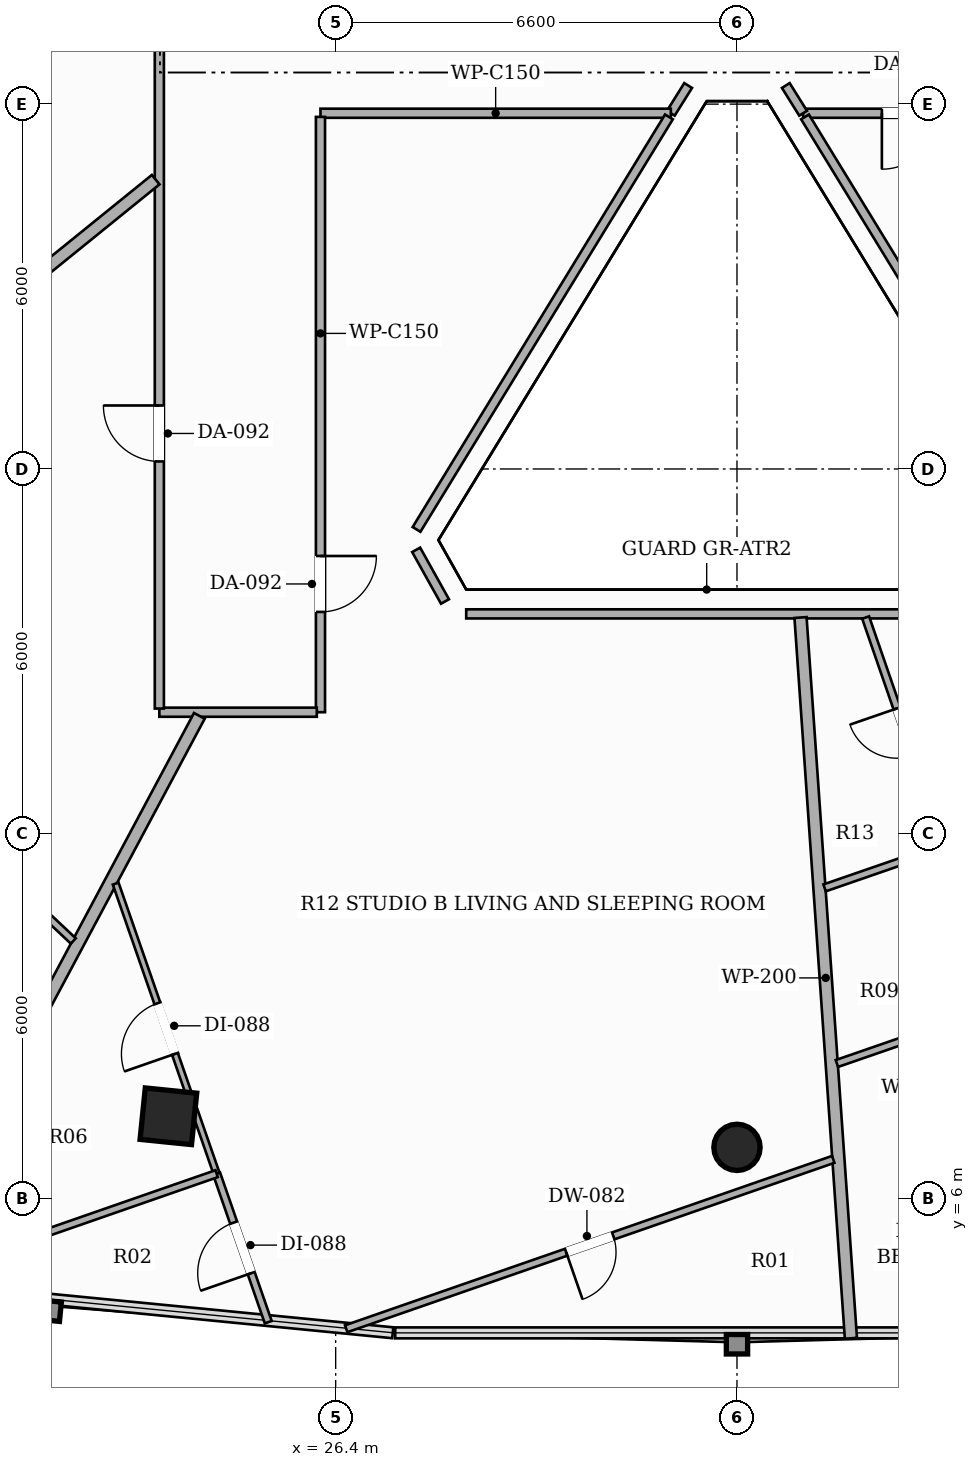
"""IFC4 building model, lengths in metres.
Left out: names, types, materials, properties, quantities, classifications, styles, units other than length and angle.
Written with IfcOpenShell. Run it as: python <this file> out.ifc"""

import sys

from ifc_helpers import new_model, si_unit, direction, frame, frame_2d, origin, origin_2d, place, context, subcontext, project, spatial, rectangle, hollow_rectangle, hollow_circle, extrude, element, fill, save


model = new_model("IFC4")
c1 = context("Model", 3, precision=1e-05, world=origin(), true_north=direction((0.0, 1.0)))
c2 = subcontext(c1, "Body", "Model", "MODEL_VIEW")
j1 = project(units=[si_unit("LENGTHUNIT", "METRE"), si_unit("PLANEANGLEUNIT", "RADIAN")], contexts=[c1])
p1 = place(None, origin())
s1 = spatial("IfcSite", under=j1, at=p1, CompositionType="ELEMENT")
p2 = place(p1, origin())
s2 = spatial("IfcBuilding", under=s1, at=p2, CompositionType="ELEMENT")
p3 = place(p2, frame((0.0, 0.0, 163.85)))
s3 = spatial("IfcBuildingStorey", under=s2, at=p3, CompositionType="ELEMENT", Elevation=163.85)
p4 = place(p3, frame((23.649, 7.355, 0.0), z_axis=(0.0, 0.0, 1.0), x_axis=(-0.994880708829, 0.101056297183, 0.0)))
e1 = element("IfcColumn", 1, at=p4, inside=s3, PredefinedType="COLUMN", context=c2, shape_type="SweptSolid", body=[
    extrude(hollow_rectangle(XDim=0.85, YDim=0.85, WallThickness=0.028, at=origin_2d()), origin(), (0.0, 0.0, 1.0), 3.3),
])
p5 = place(p3, frame((33.0, 6.844, 0.0), z_axis=(0.0, 0.0, 1.0), x_axis=(1.0, 0.0, 0.0)))
e2 = element("IfcColumn", 2, at=p5, inside=s3, PredefinedType="COLUMN", context=c2, shape_type="SweptSolid", body=[
    extrude(hollow_circle(Radius=0.381, WallThickness=0.022, at=origin_2d()), origin(), (0.0, 0.0, 1.0), 3.3),
])
p6 = place(p3, frame((32.197, 24.306, 0.0), z_axis=(0.0, 0.0, 1.0), x_axis=(-0.530039765459, -0.847972786728, 0.0)))
e3 = element("IfcWall", 3, at=p6, inside=s3, PredefinedType="PARTITIONING", context=c2, shape_type="SweptSolid", body=[
    extrude(rectangle(XDim=0.538, YDim=0.15, at=frame_2d((0.269, 0.0))), origin(), (0.0, 0.0, 1.0), 3.06),
])
p7 = place(p3, frame((31.912, 23.85, 0.0), z_axis=(0.0, 0.0, 1.0), x_axis=(-1.0, 0.0, 0.0)))
e4 = element("IfcWall", 4, at=p7, inside=s3, PredefinedType="PARTITIONING", context=c2, shape_type="SweptSolid", body=[
    extrude(rectangle(XDim=5.762, YDim=0.15, at=frame_2d((2.881, 0.0))), origin(), (0.0, 0.0, 1.0), 2.721),
])
p8 = place(p3, frame((26.15, 23.79, 0.0), z_axis=(0.0, 0.0, 1.0), x_axis=(0.0, -1.0, 0.0)))
e5 = element("IfcWall", 5, at=p8, inside=s3, PredefinedType="PARTITIONING", context=c2, shape_type="SweptSolid", body=[
    extrude(rectangle(XDim=9.79, YDim=0.15, at=frame_2d((4.895, 0.0))), origin(), (0.0, 0.0, 1.0), 2.721),
])
p9 = place(p8, frame((7.221, 0.0, 0.0)))
e6 = element("IfcOpeningElement", 6, at=p9, cuts=e5, PredefinedType="OPENING", context=c2, shape_type="SweptSolid", body=[
    extrude(rectangle(XDim=0.92, YDim=2.15, at=frame_2d((0.46, 1.075))), frame((0.0, 0.085, 0.0), z_axis=(0.0, -1.0, 0.0), x_axis=(1.0, 0.0, 0.0)), (0.0, 0.0, 1.0), 0.17),
])
p10 = place(p3, frame((26.09, 14.0, 0.0), z_axis=(0.0, 0.0, 1.0), x_axis=(-1.0, 0.0, 0.0)))
e7 = element("IfcWall", 7, at=p10, inside=s3, PredefinedType="PARTITIONING", context=c2, shape_type="SweptSolid", body=[
    extrude(rectangle(XDim=2.59, YDim=0.15, at=frame_2d((1.295, 0.0))), origin(), (0.0, 0.0, 1.0), 2.721),
])
p11 = place(p3, frame((23.5, 14.06, 0.0), z_axis=(0.0, 0.0, 1.0), x_axis=(0.0, 1.0, 0.0)))
e8 = element("IfcWall", 8, at=p11, inside=s3, PredefinedType="PARTITIONING", context=c2, shape_type="SweptSolid", body=[
    extrude(rectangle(XDim=22.84, YDim=0.15, at=frame_2d((11.42, 0.0))), origin(), (0.0, 0.0, 1.0), 2.413),
])
p12 = place(p11, frame((4.064, 0.0, 0.0)))
e9 = element("IfcOpeningElement", 9, at=p12, cuts=e8, PredefinedType="OPENING", context=c2, shape_type="SweptSolid", body=[
    extrude(rectangle(XDim=0.92, YDim=2.15, at=frame_2d((0.46, 1.075))), frame((0.0, 0.085, 0.0), z_axis=(0.0, -1.0, 0.0), x_axis=(1.0, 0.0, 0.0)), (0.0, 0.0, 1.0), 0.17),
])
p13 = place(p11, frame((13.047, 0.0, 0.0)))
e10 = element("IfcOpeningElement", 10, at=p13, cuts=e8, PredefinedType="OPENING", context=c2, shape_type="SweptSolid", body=[
    extrude(rectangle(XDim=0.88, YDim=2.1, at=frame_2d((0.44, 1.05))), frame((0.0, 0.085, 0.0), z_axis=(0.0, -1.0, 0.0), x_axis=(1.0, 0.0, 0.0)), (0.0, 0.0, 1.0), 0.17),
])
p14 = place(p11, frame((19.953, 0.0, 0.0)))
e11 = element("IfcOpeningElement", 11, at=p14, cuts=e8, PredefinedType="OPENING", context=c2, shape_type="SweptSolid", body=[
    extrude(rectangle(XDim=0.92, YDim=2.15, at=frame_2d((0.46, 1.075))), frame((0.0, 0.085, 0.0), z_axis=(0.0, -1.0, 0.0), x_axis=(1.0, 0.0, 0.0)), (0.0, 0.0, 1.0), 0.17),
])
p15 = place(p3, frame((42.29, 23.85, 0.0), z_axis=(0.0, 0.0, 1.0), x_axis=(-1.0, 0.0, 0.0)))
e12 = element("IfcWall", 12, at=p15, inside=s3, PredefinedType="PARTITIONING", context=c2, shape_type="SweptSolid", body=[
    extrude(rectangle(XDim=8.202, YDim=0.15, at=frame_2d((4.101, 0.0))), origin(), (0.0, 0.0, 1.0), 2.492),
])
p16 = place(p15, frame((5.987, 0.0, 0.0)))
e13 = element("IfcOpeningElement", 13, at=p16, cuts=e12, PredefinedType="OPENING", context=c2, shape_type="SweptSolid", body=[
    extrude(rectangle(XDim=0.92, YDim=2.15, at=frame_2d((0.46, 1.075))), frame((0.0, 0.085, 0.0), z_axis=(0.0, -1.0, 0.0), x_axis=(1.0, 0.0, 0.0)), (0.0, 0.0, 1.0), 0.17),
])
p17 = place(p15, frame((0.894, 0.0, 0.0)))
e14 = element("IfcOpeningElement", 14, at=p17, cuts=e12, PredefinedType="OPENING", context=c2, shape_type="SweptSolid", body=[
    extrude(rectangle(XDim=0.88, YDim=2.1, at=frame_2d((0.44, 1.05))), frame((0.0, 0.085, 0.0), z_axis=(0.0, -1.0, 0.0), x_axis=(1.0, 0.0, 0.0)), (0.0, 0.0, 1.0), 0.17),
])
p18 = place(p15, frame((3.169, 0.0, 0.0)))
e15 = element("IfcOpeningElement", 15, at=p18, cuts=e12, PredefinedType="OPENING", context=c2, shape_type="SweptSolid", body=[
    extrude(rectangle(XDim=0.88, YDim=2.1, at=frame_2d((0.44, 1.05))), frame((0.0, 0.085, 0.0), z_axis=(0.0, -1.0, 0.0), x_axis=(1.0, 0.0, 0.0)), (0.0, 0.0, 1.0), 0.17),
])
p19 = place(p3, frame((34.088, 23.85, 0.0), z_axis=(0.0, 0.0, 1.0), x_axis=(-0.530039765459, 0.847972786728, 0.0)))
e16 = element("IfcWall", 16, at=p19, inside=s3, PredefinedType="PARTITIONING", context=c2, shape_type="SweptSolid", body=[
    extrude(rectangle(XDim=0.538, YDim=0.15, at=frame_2d((0.269, 0.0))), origin(), (0.0, 0.0, 1.0), 3.06),
])
p20 = place(p3, frame((34.119, 23.79, 0.0), z_axis=(0.0, 0.0, 1.0), x_axis=(0.521942869651, -0.852980445744, 0.0)))
e17 = element("IfcWall", 17, at=p20, inside=s3, PredefinedType="PARTITIONING", context=c2, shape_type="SweptSolid", body=[
    extrude(rectangle(XDim=7.953, YDim=0.15, at=frame_2d((3.977, 0.0))), origin(), (0.0, 0.0, 1.0), 2.721),
])
p21 = place(p3, frame((37.453, 15.617, 0.0), z_axis=(0.0, 0.0, 1.0), x_axis=(-1.0, 0.0, 0.0)))
e18 = element("IfcWall", 18, at=p21, inside=s3, PredefinedType="PARTITIONING", context=c2, shape_type="SweptSolid", body=[
    extrude(rectangle(XDim=8.906, YDim=0.15, at=frame_2d((4.453, 0.0))), origin(), (0.0, 0.0, 1.0), 2.721),
])
p22 = place(p3, frame((28.198, 15.821, 0.0), z_axis=(0.0, 0.0, 1.0), x_axis=(-0.487432951818, 0.873160419099, 0.0)))
e19 = element("IfcWall", 19, at=p22, inside=s3, PredefinedType="PARTITIONING", context=c2, shape_type="SweptSolid", body=[
    extrude(rectangle(XDim=0.972, YDim=0.15, at=frame_2d((0.486, 0.0))), origin(), (0.0, 0.0, 1.0), 3.06),
])
p23 = place(p3, frame((27.73, 17.006, 0.0), z_axis=(0.0, 0.0, 1.0), x_axis=(0.521942869651, 0.852980445744, 0.0)))
e20 = element("IfcWall", 20, at=p23, inside=s3, PredefinedType="PARTITIONING", context=c2, shape_type="SweptSolid", body=[
    extrude(rectangle(XDim=7.953, YDim=0.15, at=frame_2d((3.977, 0.0))), origin(), (0.0, 0.0, 1.0), 2.721),
])
p24 = place(p3, frame((34.874, 3.704, 0.0), z_axis=(0.0, 0.0, 1.0), x_axis=(-0.069779440561, 0.997562443998, 0.0)))
e21 = element("IfcWall", 21, at=p24, inside=s3, PredefinedType="PARTITIONING", context=c2, shape_type="SweptSolid", body=[
    extrude(rectangle(XDim=11.882, YDim=0.2, at=frame_2d((5.941, 0.0))), origin(), (0.0, 0.0, 1.0), 2.413),
])
p25 = place(p3, frame((19.145, 4.55, 0.0), z_axis=(0.0, 0.0, 1.0), x_axis=(0.470953669838, 0.882157945533, 0.0)))
e22 = element("IfcWall", 22, at=p25, inside=s3, PredefinedType="PARTITIONING", context=c2, shape_type="SweptSolid", body=[
    extrude(rectangle(XDim=10.644, YDim=0.2, at=frame_2d((5.322, 0.0))), origin(), (0.0, 0.0, 1.0), 2.413),
])
p26 = place(p3, frame((8.887, 10.973, 0.0), z_axis=(0.0, 0.0, 1.0), x_axis=(0.777135864284, 0.629332859815, 0.0)))
e23 = element("IfcWall", 23, at=p26, inside=s3, PredefinedType="PARTITIONING", context=c2, shape_type="SweptSolid", body=[
    extrude(rectangle(XDim=18.726, YDim=0.2, at=frame_2d((9.363, 0.0))), origin(), (0.0, 0.0, 1.0), 2.413),
])
p27 = place(p3, frame((36.417, 11.794, 0.0), z_axis=(0.0, 0.0, 1.0), x_axis=(-0.326767254884, 0.945104841346, 0.0)))
e24 = element("IfcWall", 24, at=p27, inside=s3, PredefinedType="PARTITIONING", context=c2, shape_type="SweptSolid", body=[
    extrude(rectangle(XDim=3.981, YDim=0.12, at=frame_2d((1.991, 0.0))), origin(), (0.0, 0.0, 1.0), 3.06),
])
p28 = place(p27, frame((1.581, 0.0, 0.0)))
e25 = element("IfcOpeningElement", 25, at=p28, cuts=e24, PredefinedType="OPENING", context=c2, shape_type="SweptSolid", body=[
    extrude(rectangle(XDim=0.82, YDim=2.1, at=frame_2d((0.41, 1.05))), frame((0.0, 0.07, 0.0), z_axis=(0.0, -1.0, 0.0), x_axis=(1.0, 0.0, 0.0)), (0.0, 0.0, 1.0), 0.14),
])
p29 = place(p3, frame((36.417, 11.794, 0.0), z_axis=(0.0, 0.0, 1.0), x_axis=(-0.945158093584, -0.326613193446, 0.0)))
e26 = element("IfcWall", 26, at=p29, inside=s3, PredefinedType="PARTITIONING", context=c2, shape_type="SweptSolid", body=[
    extrude(rectangle(XDim=2.091, YDim=0.12, at=frame_2d((1.045, 0.0))), origin(), (0.0, 0.0, 1.0), 3.06),
])
p30 = place(p3, frame((37.33, 9.152, 0.0), z_axis=(0.0, 0.0, 1.0), x_axis=(-0.945086078656, -0.326821516933, 0.0)))
e27 = element("IfcWall", 27, at=p30, inside=s3, PredefinedType="PARTITIONING", context=c2, shape_type="SweptSolid", body=[
    extrude(rectangle(XDim=2.843, YDim=0.12, at=frame_2d((1.422, 0.0))), origin(), (0.0, 0.0, 1.0), 2.721),
])
p31 = place(p3, frame((34.583, 6.646, 0.0), z_axis=(0.0, 0.0, 1.0), x_axis=(-0.944539899325, -0.328396678704, 0.0)))
e28 = element("IfcWall", 28, at=p31, inside=s3, PredefinedType="PARTITIONING", context=c2, shape_type="SweptSolid", body=[
    extrude(rectangle(XDim=8.48, YDim=0.12, at=frame_2d((4.24, 0.0))), origin(), (0.0, 0.0, 1.0), 2.413),
])
p32 = place(p31, frame((3.83, 0.0, 0.0)))
e29 = element("IfcOpeningElement", 29, at=p32, cuts=e28, PredefinedType="OPENING", context=c2, shape_type="SweptSolid", body=[
    extrude(rectangle(XDim=0.82, YDim=2.1, at=frame_2d((0.41, 1.05))), frame((0.0, 0.07, 0.0), z_axis=(0.0, -1.0, 0.0), x_axis=(1.0, 0.0, 0.0)), (0.0, 0.0, 1.0), 0.14),
])
p33 = place(p3, frame((25.291, 3.969, 0.0), z_axis=(0.0, 0.0, 1.0), x_axis=(-0.328440044658, 0.944524820778, 0.0)))
e30 = element("IfcWall", 30, at=p33, inside=s3, PredefinedType="PARTITIONING", context=c2, shape_type="SweptSolid", body=[
    extrude(rectangle(XDim=2.585, YDim=0.12, at=frame_2d((1.292, 0.0))), origin(), (0.0, 0.0, 1.0), 3.06),
])
p34 = place(p33, frame((0.853, 0.0, 0.0)))
e31 = element("IfcOpeningElement", 31, at=p34, cuts=e30, PredefinedType="OPENING", context=c2, shape_type="SweptSolid", body=[
    extrude(rectangle(XDim=0.88, YDim=2.1, at=frame_2d((0.44, 1.05))), frame((0.0, 0.07, 0.0), z_axis=(0.0, -1.0, 0.0), x_axis=(1.0, 0.0, 0.0)), (0.0, 0.0, 1.0), 0.14),
])
p35 = place(p3, frame((24.442, 6.411, 0.0), z_axis=(0.0, 0.0, 1.0), x_axis=(-0.328597479572, 0.944470061155, 0.0)))
e32 = element("IfcWall", 32, at=p35, inside=s3, PredefinedType="PARTITIONING", context=c2, shape_type="SweptSolid", body=[
    extrude(rectangle(XDim=5.052, YDim=0.1, at=frame_2d((2.526, 0.0))), origin(), (0.0, 0.0, 1.0), 2.413),
])
p36 = place(p35, frame((2.086, 0.0, 0.0)))
e33 = element("IfcOpeningElement", 33, at=p36, cuts=e32, PredefinedType="OPENING", context=c2, shape_type="SweptSolid", body=[
    extrude(rectangle(XDim=0.88, YDim=2.1, at=frame_2d((0.44, 1.05))), frame((0.0, 0.06, 0.0), z_axis=(0.0, -1.0, 0.0), x_axis=(1.0, 0.0, 0.0)), (0.0, 0.0, 1.0), 0.12),
])
p37 = place(p3, frame((19.276, 4.614, 0.0), z_axis=(0.0, 0.0, 1.0), x_axis=(0.944496796706, 0.328520624941, 0.0)))
e34 = element("IfcWall", 34, at=p37, inside=s3, PredefinedType="PARTITIONING", context=c2, shape_type="SweptSolid", body=[
    extrude(rectangle(XDim=5.469, YDim=0.12, at=frame_2d((2.735, 0.0))), origin(), (0.0, 0.0, 1.0), 2.619),
])
p38 = place(p3, frame((22.085, 10.238, 0.0), z_axis=(0.0, 0.0, 1.0), x_axis=(-0.728663547615, 0.684871837921, 0.0)))
e35 = element("IfcWall", 35, at=p38, inside=s3, PredefinedType="PARTITIONING", context=c2, shape_type="SweptSolid", body=[
    extrude(rectangle(XDim=2.241, YDim=0.12, at=frame_2d((1.121, 0.0))), origin(), (0.0, 0.0, 1.0), 2.721),
])
p39 = place(p16, origin())
e36 = element("IfcDoor", 36, at=p39, inside=s3, OperationType="SINGLE_SWING_RIGHT", PredefinedType="DOOR", context=c2, shape_type="SweptSolid", body=[
    extrude(rectangle(XDim=0.92, YDim=2.15, at=frame_2d((0.46, 1.075))), frame((0.0, 0.025, 0.0), z_axis=(0.0, -1.0, 0.0), x_axis=(1.0, 0.0, 0.0)), (0.0, 0.0, 1.0), 0.05),
])
fill(e13, e36)
p40 = place(p28, origin())
e37 = element("IfcDoor", 37, at=p40, inside=s3, OperationType="SINGLE_SWING_RIGHT", PredefinedType="DOOR", context=c2, shape_type="SweptSolid", body=[
    extrude(rectangle(XDim=0.82, YDim=2.1, at=frame_2d((0.41, 1.05))), frame((0.0, 0.025, 0.0), z_axis=(0.0, -1.0, 0.0), x_axis=(1.0, 0.0, 0.0)), (0.0, 0.0, 1.0), 0.05),
])
fill(e25, e37)
p41 = place(p9, origin())
e38 = element("IfcDoor", 38, at=p41, inside=s3, OperationType="SINGLE_SWING_LEFT", PredefinedType="DOOR", context=c2, shape_type="SweptSolid", body=[
    extrude(rectangle(XDim=0.92, YDim=2.15, at=frame_2d((0.46, 1.075))), frame((0.0, 0.025, 0.0), z_axis=(0.0, -1.0, 0.0), x_axis=(1.0, 0.0, 0.0)), (0.0, 0.0, 1.0), 0.05),
])
fill(e6, e38)
p42 = place(p32, origin())
e39 = element("IfcDoor", 39, at=p42, inside=s3, OperationType="SINGLE_SWING_RIGHT", PredefinedType="DOOR", context=c2, shape_type="SweptSolid", body=[
    extrude(rectangle(XDim=0.82, YDim=2.1, at=frame_2d((0.41, 1.05))), frame((0.0, 0.025, 0.0), z_axis=(0.0, -1.0, 0.0), x_axis=(1.0, 0.0, 0.0)), (0.0, 0.0, 1.0), 0.05),
])
fill(e29, e39)
p43 = place(p34, origin())
e40 = element("IfcDoor", 40, at=p43, inside=s3, OperationType="SINGLE_SWING_LEFT", PredefinedType="DOOR", context=c2, shape_type="SweptSolid", body=[
    extrude(rectangle(XDim=0.88, YDim=2.1, at=frame_2d((0.44, 1.05))), frame((0.0, 0.025, 0.0), z_axis=(0.0, -1.0, 0.0), x_axis=(1.0, 0.0, 0.0)), (0.0, 0.0, 1.0), 0.05),
])
fill(e31, e40)
p44 = place(p36, origin())
e41 = element("IfcDoor", 41, at=p44, inside=s3, OperationType="SINGLE_SWING_LEFT", PredefinedType="DOOR", context=c2, shape_type="SweptSolid", body=[
    extrude(rectangle(XDim=0.88, YDim=2.1, at=frame_2d((0.44, 1.05))), frame((0.0, 0.025, 0.0), z_axis=(0.0, -1.0, 0.0), x_axis=(1.0, 0.0, 0.0)), (0.0, 0.0, 1.0), 0.05),
])
fill(e33, e41)
p45 = place(p12, origin())
e42 = element("IfcDoor", 42, at=p45, inside=s3, OperationType="SINGLE_SWING_RIGHT", PredefinedType="DOOR", context=c2, shape_type="SweptSolid", body=[
    extrude(rectangle(XDim=0.92, YDim=2.15, at=frame_2d((0.46, 1.075))), frame((0.0, 0.025, 0.0), z_axis=(0.0, -1.0, 0.0), x_axis=(1.0, 0.0, 0.0)), (0.0, 0.0, 1.0), 0.05),
])
fill(e9, e42)
save(model, sys.argv[1])
